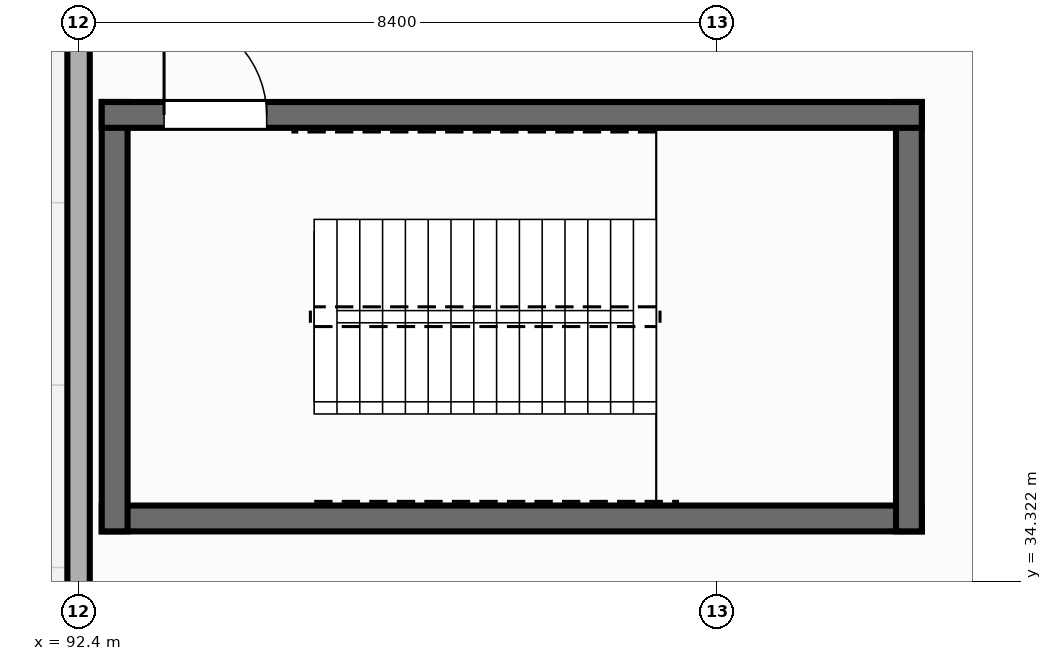
"""IFC4 building model, lengths in metres.
Left out: names, types, materials, properties, quantities, classifications, styles, units other than length and angle.
Written with IfcOpenShell. Run it as: python <this file> out.ifc"""

import sys

from ifc_helpers import new_model, si_unit, direction, frame, frame_2d, origin, place, context, subcontext, project, spatial, rectangle, extrude, element, fill, save


model = new_model("IFC4")
c1 = context("Model", 3, precision=1e-05, world=origin(), true_north=direction((0.0, 1.0)))
c2 = subcontext(c1, "Body", "Model", "MODEL_VIEW")
j1 = project(units=[si_unit("LENGTHUNIT", "METRE"), si_unit("PLANEANGLEUNIT", "RADIAN")], contexts=[c1])
p1 = place(None, origin())
s1 = spatial("IfcSite", under=j1, at=p1, CompositionType="ELEMENT")
p2 = place(p1, origin())
s2 = spatial("IfcBuilding", under=s1, at=p2, CompositionType="ELEMENT")
p3 = place(p2, origin())
s3 = spatial("IfcBuildingStorey", under=s2, at=p3, CompositionType="ELEMENT", Elevation=0.0)
p4 = place(p3, frame((92.4, 41.679, 0.0), z_axis=(0.0, 0.0, 1.0), x_axis=(0.0, -1.0, 0.0)))
e1 = element("IfcWall", 1, at=p4, inside=s3, PredefinedType="STANDARD", context=c2, shape_type="SweptSolid", body=[
    extrude(rectangle(XDim=7.758, YDim=0.295, at=frame_2d((3.879, 0.0))), origin(), (0.0, 0.0, 1.0), 4.887),
])
p5 = place(p3, frame((92.705, 35.145, 0.0), z_axis=(0.0, 0.0, 1.0), x_axis=(1.0, 0.0, 0.0)))
e2 = element("IfcWall", 2, at=p5, inside=s3, PredefinedType="SHEAR", context=c2, shape_type="SweptSolid", body=[
    extrude(rectangle(XDim=10.79, YDim=0.34, at=frame_2d((5.395, 0.0))), origin(), (0.0, 0.0, 1.0), 5.175),
])
for number, where, z_axis, x_axis in (
    (3, (92.875, 34.975, 0.0), (0.0, 0.0, 1.0), (0.0, 1.0, 0.0)),
    (4, (103.325, 34.975, 0.0), (0.0, 0.0, 1.0), (0.0, 1.0, 0.0)),
):
    element("IfcWall", number, at=place(p3, frame(where, z_axis=z_axis, x_axis=x_axis)), inside=s3, PredefinedType="SHEAR", context=c2, shape_type="SweptSolid", body=[
        extrude(rectangle(XDim=5.65, YDim=0.34, at=frame_2d((2.825, 0.0))), origin(), (0.0, 0.0, 1.0), 5.175),
    ])
p6 = place(p3, frame((92.705, 40.455, 0.0), z_axis=(0.0, 0.0, 1.0), x_axis=(1.0, 0.0, 0.0)))
e5 = element("IfcWall", 5, at=p6, inside=s3, PredefinedType="SHEAR", context=c2, shape_type="SweptSolid", body=[
    extrude(rectangle(XDim=10.79, YDim=0.34, at=frame_2d((5.395, 0.0))), origin(), (0.0, 0.0, 1.0), 5.175),
])
p7 = place(p6, frame((0.82, 0.0, 0.0)))
e6 = element("IfcOpeningElement", 6, at=p7, cuts=e5, PredefinedType="OPENING", context=c2, shape_type="SweptSolid", body=[
    extrude(rectangle(XDim=1.35, YDim=2.2, at=frame_2d((0.675, 1.1))), frame((0.0, 0.18, 0.0), z_axis=(0.0, -1.0, 0.0), x_axis=(1.0, 0.0, 0.0)), (0.0, 0.0, 1.0), 0.36),
])
p8 = place(p7, origin())
e7 = element("IfcDoor", 7, at=p8, inside=s3, OperationType="SINGLE_SWING_LEFT", PredefinedType="DOOR", context=c2, shape_type="SweptSolid", body=[
    extrude(rectangle(XDim=1.35, YDim=2.2, at=frame_2d((0.675, 1.1))), frame((0.0, 0.025, 0.0), z_axis=(0.0, -1.0, 0.0), x_axis=(1.0, 0.0, 0.0)), (0.0, 0.0, 1.0), 0.05),
])
fill(e6, e7)
save(model, sys.argv[1])
